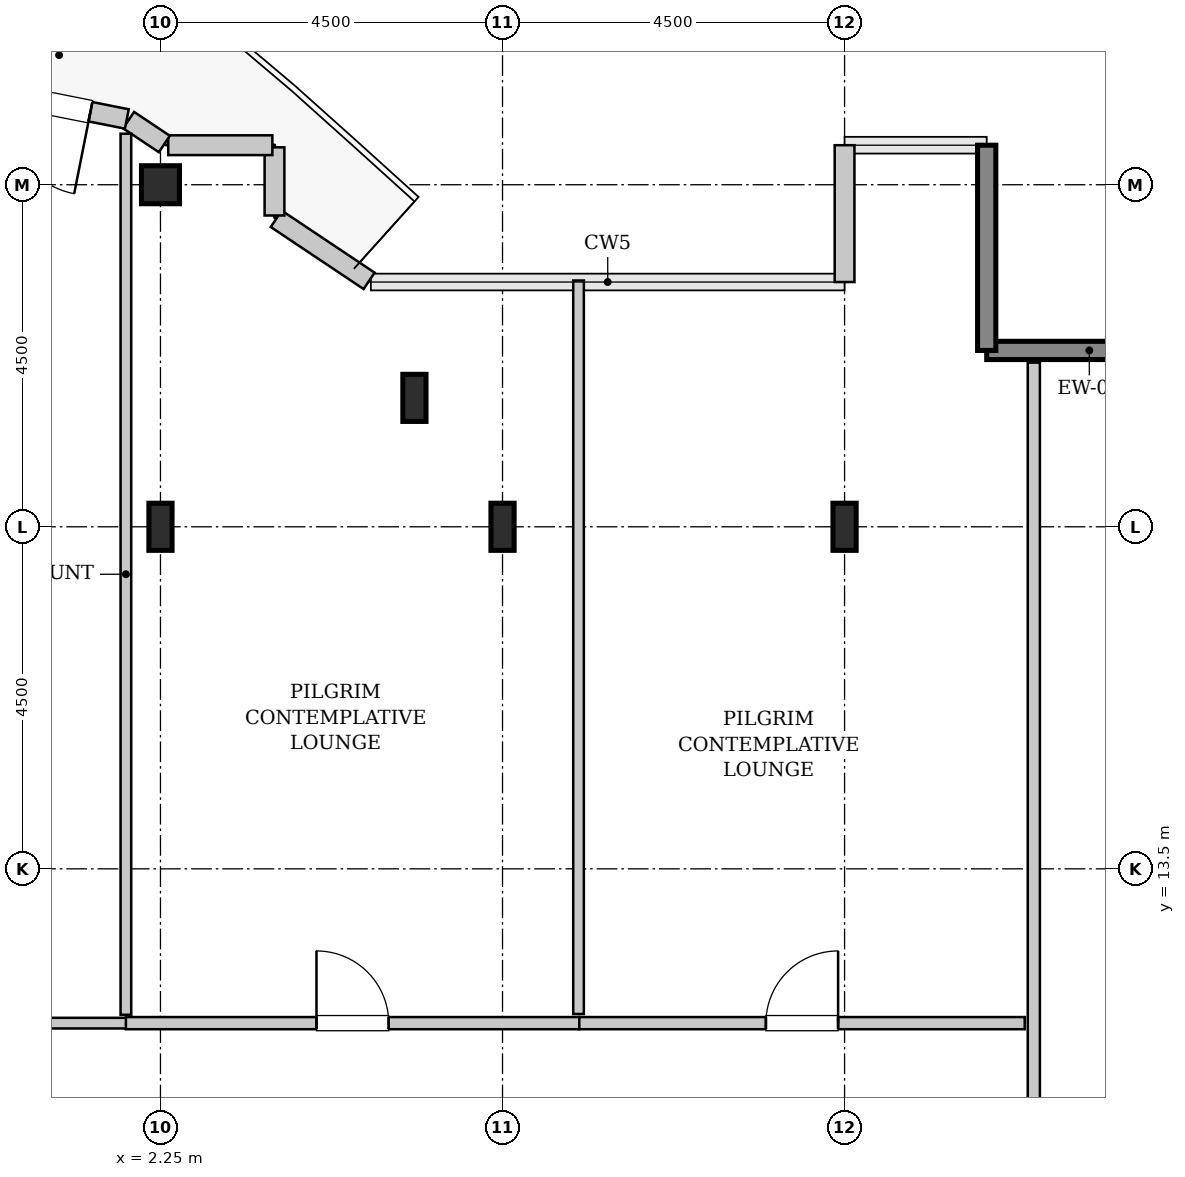
"""IFC4 building model, lengths in metres.
Left out: names, types, materials, properties, quantities, classifications, styles, units other than length and angle.
Written with IfcOpenShell. Run it as: python <this file> out.ifc"""

import sys

from ifc_helpers import new_model, si_unit, direction, frame, frame_2d, origin, origin_2d, place, context, subcontext, project, spatial, rectangle, hollow_rectangle, i_section, extrude, source, transform, mapped, element, fill, save


model = new_model("IFC4")
c1 = context("Model", 3, precision=1e-05, world=origin(), true_north=direction((0.0, 1.0)))
c2 = subcontext(c1, "Body", "Model", "MODEL_VIEW")
j1 = project(units=[si_unit("LENGTHUNIT", "METRE"), si_unit("PLANEANGLEUNIT", "RADIAN")], contexts=[c1])
p1 = place(None, origin())
s1 = spatial("IfcSite", under=j1, at=p1, CompositionType="ELEMENT")
p2 = place(p1, origin())
s2 = spatial("IfcBuilding", under=s1, at=p2, CompositionType="ELEMENT")
p3 = place(p2, frame((0.0, 0.0, 326.2)))
s3 = spatial("IfcBuildingStorey", under=s2, at=p3, CompositionType="ELEMENT", Elevation=326.2)
m1 = source(origin(), c2, "Body", "SweptSolid", [
    extrude(i_section(OverallWidth=0.305, OverallDepth=0.62, WebThickness=0.021, FlangeThickness=0.04, FilletRadius=0.027, at=origin_2d()), origin(), (0.0, 0.0, 1.0), 3.8),
])
p4 = place(p3, frame((2.25, 18.0, 0.0), z_axis=(0.0, 0.0, 1.0), x_axis=(1.0, 0.0, 0.0)))
e1 = element("IfcColumn", 1, at=p4, inside=s3, PredefinedType="COLUMN", context=c2, shape_type="MappedRepresentation", body=[
    mapped(m1, transform((0.0, 0.0, 0.0), x_axis=(1.0, 0.0, 0.0), y_axis=(0.0, 1.0, 0.0), z_axis=(0.0, 0.0, 1.0), scale=1.0)),
])
m2 = source(origin(), c2, "Body", "SweptSolid", [
    extrude(hollow_rectangle(XDim=0.5, YDim=0.5, WallThickness=0.025, InnerFilletRadius=0.025, OuterFilletRadius=0.05, at=origin_2d()), origin(), (0.0, 0.0, 1.0), 3.8),
])
p5 = place(p3, frame((2.25, 22.5, 0.0), z_axis=(0.0, 0.0, 1.0), x_axis=(1.0, 0.0, 0.0)))
e2 = element("IfcColumn", 2, at=p5, inside=s3, PredefinedType="COLUMN", context=c2, shape_type="MappedRepresentation", body=[
    mapped(m2, transform((0.0, 0.0, 0.0), x_axis=(1.0, 0.0, 0.0), y_axis=(0.0, 1.0, 0.0), z_axis=(0.0, 0.0, 1.0), scale=1.0)),
])
for number, where, z_axis, x_axis in (
    (3, (5.591, 19.696, 0.0), (0.0, 0.0, 1.0), (1.0, 0.0, 0.0)),
    (4, (6.75, 18.0, 0.0), (0.0, 0.0, 1.0), (1.0, 0.0, 0.0)),
    (5, (11.25, 18.0, 0.0), (0.0, 0.0, 1.0), (1.0, 0.0, 0.0)),
):
    element("IfcColumn", number, at=place(p3, frame(where, z_axis=z_axis, x_axis=x_axis)), inside=s3, PredefinedType="COLUMN", context=c2, shape_type="MappedRepresentation", body=[
        mapped(m1, transform((0.0, 0.0, 0.0), x_axis=(1.0, 0.0, 0.0), y_axis=(0.0, 1.0, 0.0), z_axis=(0.0, 0.0, 1.0), scale=1.0)),
    ])
m3 = source(origin(), c2, "Body", "SweptSolid", [
    extrude(rectangle(XDim=2.7, YDim=0.24, at=frame_2d((1.35, 0.0))), origin(), (0.0, 0.0, 1.0), 3.55),
])
for number, where, z_axis, x_axis in (
    (6, (15.82, 20.32, 0.0), (0.0, 0.0, 1.0), (-1.0, 0.0, 0.0)),
    (7, (13.12, 20.32, 0.0), (0.0, 0.0, 1.0), (0.0, 1.0, 0.0)),
):
    element("IfcWall", number, at=place(p3, frame(where, z_axis=z_axis, x_axis=x_axis)), inside=s3, PredefinedType="SHEAR", context=c2, shape_type="MappedRepresentation", body=[
        mapped(m3, transform((0.0, 0.0, 0.0), x_axis=(1.0, 0.0, 0.0), y_axis=(0.0, 1.0, 0.0), z_axis=(0.0, 0.0, 1.0), scale=1.0)),
    ])
m4 = source(origin(), c2, "Body", "SweptSolid", [
    extrude(rectangle(XDim=1.8, YDim=0.26, at=frame_2d((0.9, 0.0))), origin(), (0.0, 0.0, 1.0), 3.55),
])
p6 = place(p3, frame((11.25, 23.02, 0.0), z_axis=(0.0, 0.0, 1.0), x_axis=(0.0, -1.0, 0.0)))
e8 = element("IfcWall", 8, at=p6, inside=s3, PredefinedType="SOLIDWALL", context=c2, shape_type="MappedRepresentation", body=[
    mapped(m4, transform((0.0, 0.0, 0.0), x_axis=(1.0, 0.0, 0.0), y_axis=(0.0, 1.0, 0.0), z_axis=(0.0, 0.0, 1.0), scale=1.0)),
])
m5 = source(origin(), c2, "Body", "SweptSolid", [
    extrude(rectangle(XDim=1.469, YDim=0.26, at=frame_2d((0.734, 0.0))), origin(), (0.0, 0.0, 1.0), 3.55),
])
p7 = place(p3, frame((4.995, 21.236, 0.0), z_axis=(0.0, 0.0, 1.0), x_axis=(-0.831461760506, 0.555581983884, 0.0)))
e9 = element("IfcWall", 9, at=p7, inside=s3, PredefinedType="SOLIDWALL", context=c2, shape_type="MappedRepresentation", body=[
    mapped(m5, transform((0.0, 0.0, 0.0), x_axis=(1.0, 0.0, 0.0), y_axis=(0.0, 1.0, 0.0), z_axis=(0.0, 0.0, 1.0), scale=1.0)),
])
m6 = source(origin(), c2, "Body", "SweptSolid", [
    extrude(rectangle(XDim=0.897, YDim=0.26, at=frame_2d((0.448, 0.0))), origin(), (0.0, 0.0, 1.0), 3.55),
])
p8 = place(p3, frame((3.75, 22.095, 0.0), z_axis=(0.0, 0.0, 1.0), x_axis=(0.0, 1.0, 0.0)))
e10 = element("IfcWall", 10, at=p8, inside=s3, PredefinedType="SOLIDWALL", context=c2, shape_type="MappedRepresentation", body=[
    mapped(m6, transform((0.0, 0.0, 0.0), x_axis=(1.0, 0.0, 0.0), y_axis=(0.0, 1.0, 0.0), z_axis=(0.0, 0.0, 1.0), scale=1.0)),
])
m7 = source(origin(), c2, "Body", "SweptSolid", [
    extrude(rectangle(XDim=1.37, YDim=0.26, at=frame_2d((0.685, 0.0))), origin(), (0.0, 0.0, 1.0), 3.55),
])
p9 = place(p3, frame((3.722, 23.02, 0.0), z_axis=(0.0, 0.0, 1.0), x_axis=(-1.0, 0.0, 0.0)))
e11 = element("IfcWall", 11, at=p9, inside=s3, PredefinedType="SOLIDWALL", context=c2, shape_type="MappedRepresentation", body=[
    mapped(m7, transform((0.0, 0.0, 0.0), x_axis=(1.0, 0.0, 0.0), y_axis=(0.0, 1.0, 0.0), z_axis=(0.0, 0.0, 1.0), scale=1.0)),
])
m8 = source(origin(), c2, "Body", "SweptSolid", [
    extrude(rectangle(XDim=0.565, YDim=0.26, at=frame_2d((0.283, 0.0))), origin(), (0.0, 0.0, 1.0), 3.55),
])
p10 = place(p3, frame((2.301, 23.036, 0.0), z_axis=(0.0, 0.0, 1.0), x_axis=(-0.831651492666, 0.555297933317, 0.0)))
e12 = element("IfcWall", 12, at=p10, inside=s3, PredefinedType="SOLIDWALL", context=c2, shape_type="MappedRepresentation", body=[
    mapped(m8, transform((0.0, 0.0, 0.0), x_axis=(1.0, 0.0, 0.0), y_axis=(0.0, 1.0, 0.0), z_axis=(0.0, 0.0, 1.0), scale=1.0)),
])
m9 = source(origin(), c2, "Body", "SweptSolid", [
    extrude(rectangle(XDim=4.137, YDim=0.26, at=frame_2d((2.068, 0.0))), origin(), (0.0, 0.0, 1.0), 3.55),
])
p11 = place(p3, frame((1.807, 23.365, 0.0), z_axis=(0.0, 0.0, 1.0), x_axis=(-0.980782170794, 0.195105954428, 0.0)))
e13 = element("IfcWall", 13, at=p11, inside=s3, PredefinedType="SOLIDWALL", context=c2, shape_type="MappedRepresentation", body=[
    mapped(m9, transform((0.0, 0.0, 0.0), x_axis=(1.0, 0.0, 0.0), y_axis=(0.0, 1.0, 0.0), z_axis=(0.0, 0.0, 1.0), scale=1.0)),
])
p12 = place(p11, frame((0.488, 0.0, 0.0)))
e14 = element("IfcOpeningElement", 14, at=p12, cuts=e13, PredefinedType="OPENING", context=c2, shape_type="SweptSolid", body=[
    extrude(rectangle(XDim=1.1, YDim=2.2, at=frame_2d((0.55, 1.1))), frame((0.0, 0.14, 0.0), z_axis=(0.0, -1.0, 0.0), x_axis=(1.0, 0.0, 0.0)), (0.0, 0.0, 1.0), 0.28),
])
m10 = source(origin(), c2, "Body", "SweptSolid", [
    extrude(rectangle(XDim=12.365, YDim=0.16, at=frame_2d((6.183, 0.0))), origin(), (0.0, 0.0, 1.0), 3.535),
])
p13 = place(p3, frame((13.74, 7.795, 0.0), z_axis=(0.0, 0.0, 1.0), x_axis=(0.0, 1.0, 0.0)))
e15 = element("IfcWall", 15, at=p13, inside=s3, PredefinedType="PARTITIONING", context=c2, shape_type="MappedRepresentation", body=[
    mapped(m10, transform((0.0, 0.0, 0.0), x_axis=(1.0, 0.0, 0.0), y_axis=(0.0, 1.0, 0.0), z_axis=(0.0, 0.0, 1.0), scale=1.0)),
])
p14 = place(p13, frame((1.383, 0.0, 0.0)))
e16 = element("IfcOpeningElement", 16, at=p14, cuts=e15, PredefinedType="OPENING", context=c2, shape_type="SweptSolid", body=[
    extrude(rectangle(XDim=0.95, YDim=2.1, at=frame_2d((0.475, 1.05))), frame((0.0, 0.09, 0.0), z_axis=(0.0, -1.0, 0.0), x_axis=(1.0, 0.0, 0.0)), (0.0, 0.0, 1.0), 0.18),
])
m11 = source(origin(), c2, "Body", "SweptSolid", [
    extrude(rectangle(XDim=4.625, YDim=0.14, at=frame_2d((2.312, 0.0))), origin(), (0.0, 0.0, 1.0), 3.535),
])
p15 = place(p3, frame((-2.82, 11.47, 0.0), z_axis=(0.0, 0.0, 1.0), x_axis=(1.0, 0.0, 0.0)))
e17 = element("IfcWall", 17, at=p15, inside=s3, PredefinedType="PARTITIONING", context=c2, shape_type="MappedRepresentation", body=[
    mapped(m11, transform((0.0, 0.0, 0.0), x_axis=(1.0, 0.0, 0.0), y_axis=(0.0, 1.0, 0.0), z_axis=(0.0, 0.0, 1.0), scale=1.0)),
])
m12 = source(origin(), c2, "Body", "SweptSolid", [
    extrude(rectangle(XDim=11.591, YDim=0.14, at=frame_2d((5.796, 0.0))), origin(), (0.0, 0.0, 1.0), 2.975),
])
p16 = place(p3, frame((1.795, 11.58, 0.0), z_axis=(0.0, 0.0, 1.0), x_axis=(0.0, 1.0, 0.0)))
e18 = element("IfcWall", 18, at=p16, inside=s3, PredefinedType="PARTITIONING", context=c2, shape_type="MappedRepresentation", body=[
    mapped(m12, transform((0.0, 0.0, 0.0), x_axis=(1.0, 0.0, 0.0), y_axis=(0.0, 1.0, 0.0), z_axis=(0.0, 0.0, 1.0), scale=1.0)),
])
m13 = source(origin(), c2, "Body", "SweptSolid", [
    extrude(rectangle(XDim=5.965, YDim=0.16, at=frame_2d((2.982, 0.0))), origin(), (0.0, 0.0, 1.0), 3.535),
])
p17 = place(p3, frame((1.795, 11.47, 0.0), z_axis=(0.0, 0.0, 1.0), x_axis=(1.0, 0.0, 0.0)))
e19 = element("IfcWall", 19, at=p17, inside=s3, PredefinedType="PARTITIONING", context=c2, shape_type="MappedRepresentation", body=[
    mapped(m13, transform((0.0, 0.0, 0.0), x_axis=(1.0, 0.0, 0.0), y_axis=(0.0, 1.0, 0.0), z_axis=(0.0, 0.0, 1.0), scale=1.0)),
])
p18 = place(p17, frame((2.508, 0.0, 0.0)))
e20 = element("IfcOpeningElement", 20, at=p18, cuts=e19, PredefinedType="OPENING", context=c2, shape_type="SweptSolid", body=[
    extrude(rectangle(XDim=0.95, YDim=2.1, at=frame_2d((0.475, 1.05))), frame((0.0, 0.09, 0.0), z_axis=(0.0, -1.0, 0.0), x_axis=(1.0, 0.0, 0.0)), (0.0, 0.0, 1.0), 0.18),
])
m14 = source(origin(), c2, "Body", "SweptSolid", [
    extrude(rectangle(XDim=9.65, YDim=0.14, at=frame_2d((4.825, 0.0))), origin(), (0.0, 0.0, 1.0), 3.535),
])
p19 = place(p3, frame((7.75, 11.59, 0.0), z_axis=(0.0, 0.0, 1.0), x_axis=(0.0, 1.0, 0.0)))
e21 = element("IfcWall", 21, at=p19, inside=s3, PredefinedType="PARTITIONING", context=c2, shape_type="MappedRepresentation", body=[
    mapped(m14, transform((0.0, 0.0, 0.0), x_axis=(1.0, 0.0, 0.0), y_axis=(0.0, 1.0, 0.0), z_axis=(0.0, 0.0, 1.0), scale=1.0)),
])
m15 = source(origin(), c2, "Body", "SweptSolid", [
    extrude(rectangle(XDim=5.86, YDim=0.16, at=frame_2d((2.93, 0.0))), origin(), (0.0, 0.0, 1.0), 3.535),
])
p20 = place(p3, frame((7.76, 11.47, 0.0), z_axis=(0.0, 0.0, 1.0), x_axis=(1.0, 0.0, 0.0)))
e22 = element("IfcWall", 22, at=p20, inside=s3, PredefinedType="PARTITIONING", context=c2, shape_type="MappedRepresentation", body=[
    mapped(m15, transform((0.0, 0.0, 0.0), x_axis=(1.0, 0.0, 0.0), y_axis=(0.0, 1.0, 0.0), z_axis=(0.0, 0.0, 1.0), scale=1.0)),
])
p21 = place(p20, frame((2.455, 0.0, 0.0)))
e23 = element("IfcOpeningElement", 23, at=p21, cuts=e22, PredefinedType="OPENING", context=c2, shape_type="SweptSolid", body=[
    extrude(rectangle(XDim=0.95, YDim=2.1, at=frame_2d((0.475, 1.05))), frame((0.0, 0.09, 0.0), z_axis=(0.0, -1.0, 0.0), x_axis=(1.0, 0.0, 0.0)), (0.0, 0.0, 1.0), 0.18),
])
m16 = source(origin(), c2, "Body", "SweptSolid", [
    extrude(rectangle(XDim=1.1, YDim=2.2, at=frame_2d((0.55, 1.1))), frame((0.0, 0.025, 0.0), z_axis=(0.0, -1.0, 0.0), x_axis=(1.0, 0.0, 0.0)), (0.0, 0.0, 1.0), 0.05),
])
p22 = place(p12, origin())
e24 = element("IfcDoor", 24, at=p22, inside=s3, OperationType="SINGLE_SWING_LEFT", PredefinedType="DOOR", context=c2, shape_type="MappedRepresentation", body=[
    mapped(m16, transform((0.0, 0.0, 0.0), x_axis=(1.0, 0.0, 0.0), y_axis=(0.0, 1.0, 0.0), z_axis=(0.0, 0.0, 1.0), scale=1.0)),
])
fill(e14, e24)
m17 = source(origin(), c2, "Body", "SweptSolid", [
    extrude(rectangle(XDim=0.95, YDim=2.1, at=frame_2d((0.475, 1.05))), frame((0.0, 0.025, 0.0), z_axis=(0.0, -1.0, 0.0), x_axis=(1.0, 0.0, 0.0)), (0.0, 0.0, 1.0), 0.05),
])
p23 = place(p18, origin())
e25 = element("IfcDoor", 25, at=p23, inside=s3, OperationType="SINGLE_SWING_LEFT", PredefinedType="DOOR", context=c2, shape_type="MappedRepresentation", body=[
    mapped(m17, transform((0.0, 0.0, 0.0), x_axis=(1.0, 0.0, 0.0), y_axis=(0.0, 1.0, 0.0), z_axis=(0.0, 0.0, 1.0), scale=1.0)),
])
fill(e20, e25)
p24 = place(p21, origin())
e26 = element("IfcDoor", 26, at=p24, inside=s3, OperationType="SINGLE_SWING_RIGHT", PredefinedType="DOOR", context=c2, shape_type="MappedRepresentation", body=[
    mapped(m17, transform((0.0, 0.0, 0.0), x_axis=(1.0, 0.0, 0.0), y_axis=(0.0, 1.0, 0.0), z_axis=(0.0, 0.0, 1.0), scale=1.0)),
])
fill(e23, e26)
save(model, sys.argv[1])
